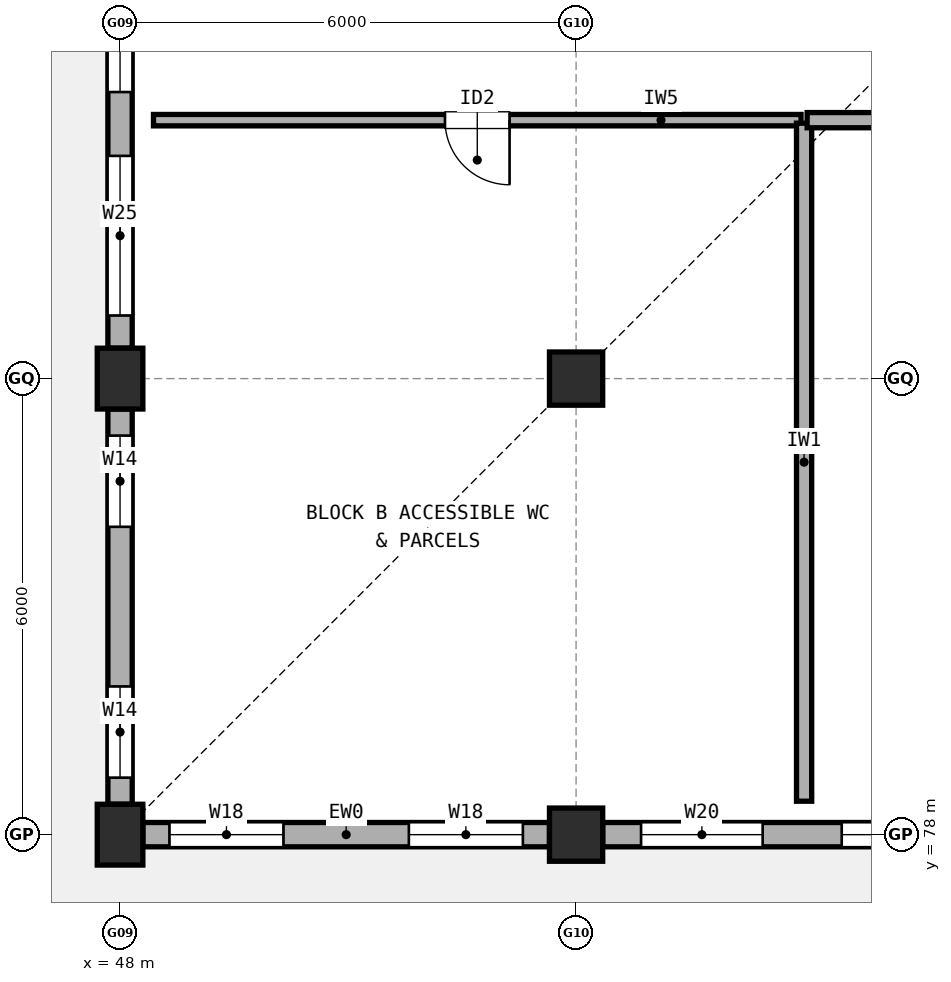
"""IFC4 building model, lengths in metres.
Left out: names, types, materials, properties, quantities, classifications, styles, units other than length and angle.
Written with IfcOpenShell. Run it as: python <this file> out.ifc"""

import sys

from ifc_helpers import new_model, si_unit, direction, frame, frame_2d, origin, origin_2d, place, context, subcontext, project, spatial, rectangle, extrude, element, fill, save


model = new_model("IFC4")
c1 = context("Model", 3, precision=1e-05, world=origin(), true_north=direction((0.0, 1.0)))
c2 = subcontext(c1, "Body", "Model", "MODEL_VIEW")
j1 = project(units=[si_unit("LENGTHUNIT", "METRE"), si_unit("PLANEANGLEUNIT", "RADIAN")], contexts=[c1])
p1 = place(None, origin())
s1 = spatial("IfcSite", under=j1, at=p1, CompositionType="ELEMENT")
p2 = place(p1, origin())
s2 = spatial("IfcBuilding", under=s1, at=p2, CompositionType="ELEMENT")
p3 = place(p2, origin())
s3 = spatial("IfcBuildingStorey", under=s2, at=p3, CompositionType="ELEMENT", Elevation=0.0)
for number, where, z_axis, x_axis in (
    (1, (48.0, 78.0, 0.0), (0.0, 0.0, 1.0), (1.0, 0.0, 0.0)),
    (2, (48.0, 84.0, 0.0), (0.0, 0.0, 1.0), (1.0, 0.0, 0.0)),
):
    element("IfcColumn", number, at=place(p3, frame(where, z_axis=z_axis, x_axis=x_axis)), inside=s3, PredefinedType="COLUMN", context=c2, shape_type="SweptSolid", body=[
        extrude(rectangle(XDim=0.6, YDim=0.8, at=origin_2d()), origin(), (0.0, 0.0, 1.0), 4.23),
    ])
for number, where, z_axis, x_axis in (
    (3, (54.0, 78.0, 0.0), (0.0, 0.0, 1.0), (1.0, 0.0, 0.0)),
    (4, (54.0, 84.0, 0.0), (0.0, 0.0, 1.0), (1.0, 0.0, 0.0)),
):
    element("IfcColumn", number, at=place(p3, frame(where, z_axis=z_axis, x_axis=x_axis)), inside=s3, PredefinedType="COLUMN", context=c2, shape_type="SweptSolid", body=[
        extrude(rectangle(XDim=0.7, YDim=0.7, at=origin_2d()), origin(), (0.0, 0.0, 1.0), 4.23),
    ])
p4 = place(p3, frame((48.3, 78.0, 0.0), z_axis=(0.0, 0.0, 1.0), x_axis=(1.0, 0.0, 0.0)))
e5 = element("IfcWall", 5, at=p4, inside=s3, PredefinedType="STANDARD", context=c2, shape_type="SweptSolid", body=[
    extrude(rectangle(XDim=5.35, YDim=0.32, at=frame_2d((2.675, 0.0))), origin(), (0.0, 0.0, 1.0), 3.112),
])
p5 = place(p4, frame((0.35, 0.0, 0.9)))
e6 = element("IfcOpeningElement", 6, at=p5, cuts=e5, PredefinedType="OPENING", context=c2, shape_type="SweptSolid", body=[
    extrude(rectangle(XDim=1.5, YDim=1.4, at=frame_2d((0.75, 0.7))), frame((0.0, 0.17, 0.0), z_axis=(0.0, -1.0, 0.0), x_axis=(1.0, 0.0, 0.0)), (0.0, 0.0, 1.0), 0.34),
])
p6 = place(p4, frame((3.5, 0.0, 0.9)))
e7 = element("IfcOpeningElement", 7, at=p6, cuts=e5, PredefinedType="OPENING", context=c2, shape_type="SweptSolid", body=[
    extrude(rectangle(XDim=1.5, YDim=1.4, at=frame_2d((0.75, 0.7))), frame((0.0, 0.17, 0.0), z_axis=(0.0, -1.0, 0.0), x_axis=(1.0, 0.0, 0.0)), (0.0, 0.0, 1.0), 0.34),
])
p7 = place(p3, frame((54.35, 78.0, 0.0), z_axis=(0.0, 0.0, 1.0), x_axis=(1.0, 0.0, 0.0)))
e8 = element("IfcWall", 8, at=p7, inside=s3, PredefinedType="STANDARD", context=c2, shape_type="SweptSolid", body=[
    extrude(rectangle(XDim=5.3, YDim=0.32, at=frame_2d((2.65, 0.0))), origin(), (0.0, 0.0, 1.0), 3.112),
])
p8 = place(p7, frame((0.505, 0.0, 0.9)))
e9 = element("IfcOpeningElement", 9, at=p8, cuts=e8, PredefinedType="OPENING", context=c2, shape_type="SweptSolid", body=[
    extrude(rectangle(XDim=1.6, YDim=1.5, at=frame_2d((0.8, 0.75))), frame((0.0, 0.17, 0.0), z_axis=(0.0, -1.0, 0.0), x_axis=(1.0, 0.0, 0.0)), (0.0, 0.0, 1.0), 0.34),
])
p9 = place(p7, frame((3.145, 0.0, 0.9)))
e10 = element("IfcOpeningElement", 10, at=p9, cuts=e8, PredefinedType="OPENING", context=c2, shape_type="SweptSolid", body=[
    extrude(rectangle(XDim=1.7, YDim=1.55, at=frame_2d((0.85, 0.775))), frame((0.0, 0.17, 0.0), z_axis=(0.0, -1.0, 0.0), x_axis=(1.0, 0.0, 0.0)), (0.0, 0.0, 1.0), 0.34),
])
p10 = place(p3, frame((48.0, 89.6, 0.0), z_axis=(0.0, 0.0, 1.0), x_axis=(0.0, -1.0, 0.0)))
e11 = element("IfcWall", 11, at=p10, inside=s3, PredefinedType="STANDARD", context=c2, shape_type="SweptSolid", body=[
    extrude(rectangle(XDim=5.2, YDim=0.32, at=frame_2d((2.6, 0.0))), origin(), (0.0, 0.0, 1.0), 3.712),
])
p11 = place(p10, frame((0.33, 0.0, 0.9)))
e12 = element("IfcOpeningElement", 12, at=p11, cuts=e11, PredefinedType="OPENING", context=c2, shape_type="SweptSolid", body=[
    extrude(rectangle(XDim=1.5, YDim=1.5, at=frame_2d((0.75, 0.75))), frame((0.0, 0.17, 0.0), z_axis=(0.0, -1.0, 0.0), x_axis=(1.0, 0.0, 0.0)), (0.0, 0.0, 1.0), 0.34),
])
p12 = place(p10, frame((2.67, 0.0, 0.9)))
e13 = element("IfcOpeningElement", 13, at=p12, cuts=e11, PredefinedType="OPENING", context=c2, shape_type="SweptSolid", body=[
    extrude(rectangle(XDim=2.1, YDim=1.55, at=frame_2d((1.05, 0.775))), frame((0.0, 0.17, 0.0), z_axis=(0.0, -1.0, 0.0), x_axis=(1.0, 0.0, 0.0)), (0.0, 0.0, 1.0), 0.34),
])
p13 = place(p3, frame((48.0, 83.6, 0.0), z_axis=(0.0, 0.0, 1.0), x_axis=(0.0, -1.0, 0.0)))
e14 = element("IfcWall", 14, at=p13, inside=s3, PredefinedType="STANDARD", context=c2, shape_type="SweptSolid", body=[
    extrude(rectangle(XDim=5.2, YDim=0.32, at=frame_2d((2.6, 0.0))), origin(), (0.0, 0.0, 1.0), 3.712),
])
p14 = place(p13, frame((0.35, 0.0, 0.9)))
e15 = element("IfcOpeningElement", 15, at=p14, cuts=e14, PredefinedType="OPENING", context=c2, shape_type="SweptSolid", body=[
    extrude(rectangle(XDim=1.2, YDim=1.5, at=frame_2d((0.6, 0.75))), frame((0.0, 0.17, 0.0), z_axis=(0.0, -1.0, 0.0), x_axis=(1.0, 0.0, 0.0)), (0.0, 0.0, 1.0), 0.34),
])
p15 = place(p13, frame((3.65, 0.0, 0.9)))
e16 = element("IfcOpeningElement", 16, at=p15, cuts=e14, PredefinedType="OPENING", context=c2, shape_type="SweptSolid", body=[
    extrude(rectangle(XDim=1.2, YDim=1.5, at=frame_2d((0.6, 0.75))), frame((0.0, 0.17, 0.0), z_axis=(0.0, -1.0, 0.0), x_axis=(1.0, 0.0, 0.0)), (0.0, 0.0, 1.0), 0.34),
])
p16 = place(p3, frame((48.44, 87.4, 0.0), z_axis=(0.0, 0.0, 1.0), x_axis=(1.0, 0.0, 0.0)))
e17 = element("IfcWall", 17, at=p16, inside=s3, PredefinedType="PARTITIONING", context=c2, shape_type="SweptSolid", body=[
    extrude(rectangle(XDim=8.52, YDim=0.15, at=frame_2d((4.26, 0.0))), origin(), (0.0, 0.0, 1.0), 3.612),
])
p17 = place(p16, frame((3.835, 0.0, 0.0)))
e18 = element("IfcOpeningElement", 18, at=p17, cuts=e17, PredefinedType="OPENING", context=c2, shape_type="SweptSolid", body=[
    extrude(rectangle(XDim=0.85, YDim=2.1, at=frame_2d((0.425, 1.05))), frame((0.0, 0.085, 0.0), z_axis=(0.0, -1.0, 0.0), x_axis=(1.0, 0.0, 0.0)), (0.0, 0.0, 1.0), 0.17),
])
p18 = place(p3, frame((57.0, 78.44, 0.0), z_axis=(0.0, 0.0, 1.0), x_axis=(0.0, 1.0, 0.0)))
e19 = element("IfcWall", 19, at=p18, inside=s3, PredefinedType="SOLIDWALL", context=c2, shape_type="SweptSolid", body=[
    extrude(rectangle(XDim=8.92, YDim=0.2, at=frame_2d((4.46, 0.0))), origin(), (0.0, 0.0, 1.0), 3.562),
])
p19 = place(p3, frame((57.04, 87.4, 0.0), z_axis=(0.0, 0.0, 1.0), x_axis=(1.0, 0.0, 0.0)))
e20 = element("IfcWall", 20, at=p19, inside=s3, PredefinedType="SOLIDWALL", context=c2, shape_type="SweptSolid", body=[
    extrude(rectangle(XDim=17.92, YDim=0.2, at=frame_2d((8.96, 0.0))), origin(), (0.0, 0.0, 1.0), 3.612),
])
p20 = place(p19, frame((8.31, 0.0, 0.0)))
e21 = element("IfcOpeningElement", 21, at=p20, cuts=e20, PredefinedType="OPENING", context=c2, shape_type="SweptSolid", body=[
    extrude(rectangle(XDim=1.3, YDim=2.15, at=frame_2d((0.65, 1.075))), frame((0.0, 0.11, 0.0), z_axis=(0.0, -1.0, 0.0), x_axis=(1.0, 0.0, 0.0)), (0.0, 0.0, 1.0), 0.22),
])
p21 = place(p5, origin())
e22 = element("IfcWindow", 22, at=p21, inside=s3, PartitioningType="SINGLE_PANEL", PredefinedType="WINDOW", context=c2, shape_type="SweptSolid", body=[
    extrude(rectangle(XDim=1.5, YDim=1.4, at=frame_2d((0.75, 0.7))), frame((0.0, 0.03, 0.0), z_axis=(0.0, -1.0, 0.0), x_axis=(1.0, 0.0, 0.0)), (0.0, 0.0, 1.0), 0.06),
])
fill(e6, e22)
p22 = place(p6, origin())
e23 = element("IfcWindow", 23, at=p22, inside=s3, PartitioningType="SINGLE_PANEL", PredefinedType="WINDOW", context=c2, shape_type="SweptSolid", body=[
    extrude(rectangle(XDim=1.5, YDim=1.4, at=frame_2d((0.75, 0.7))), frame((0.0, 0.03, 0.0), z_axis=(0.0, -1.0, 0.0), x_axis=(1.0, 0.0, 0.0)), (0.0, 0.0, 1.0), 0.06),
])
fill(e7, e23)
p23 = place(p8, origin())
e24 = element("IfcWindow", 24, at=p23, inside=s3, PartitioningType="SINGLE_PANEL", PredefinedType="WINDOW", context=c2, shape_type="SweptSolid", body=[
    extrude(rectangle(XDim=1.6, YDim=1.5, at=frame_2d((0.8, 0.75))), frame((0.0, 0.03, 0.0), z_axis=(0.0, -1.0, 0.0), x_axis=(1.0, 0.0, 0.0)), (0.0, 0.0, 1.0), 0.06),
])
fill(e9, e24)
p24 = place(p9, origin())
e25 = element("IfcWindow", 25, at=p24, inside=s3, PartitioningType="SINGLE_PANEL", PredefinedType="WINDOW", context=c2, shape_type="SweptSolid", body=[
    extrude(rectangle(XDim=1.7, YDim=1.55, at=frame_2d((0.85, 0.775))), frame((0.0, 0.03, 0.0), z_axis=(0.0, -1.0, 0.0), x_axis=(1.0, 0.0, 0.0)), (0.0, 0.0, 1.0), 0.06),
])
fill(e10, e25)
p25 = place(p11, origin())
e26 = element("IfcWindow", 26, at=p25, inside=s3, PartitioningType="SINGLE_PANEL", PredefinedType="WINDOW", context=c2, shape_type="SweptSolid", body=[
    extrude(rectangle(XDim=1.5, YDim=1.5, at=frame_2d((0.75, 0.75))), frame((0.0, 0.03, 0.0), z_axis=(0.0, -1.0, 0.0), x_axis=(1.0, 0.0, 0.0)), (0.0, 0.0, 1.0), 0.06),
])
fill(e12, e26)
p26 = place(p12, origin())
e27 = element("IfcWindow", 27, at=p26, inside=s3, PartitioningType="SINGLE_PANEL", PredefinedType="WINDOW", context=c2, shape_type="SweptSolid", body=[
    extrude(rectangle(XDim=2.1, YDim=1.55, at=frame_2d((1.05, 0.775))), frame((0.0, 0.03, 0.0), z_axis=(0.0, -1.0, 0.0), x_axis=(1.0, 0.0, 0.0)), (0.0, 0.0, 1.0), 0.06),
])
fill(e13, e27)
p27 = place(p14, origin())
e28 = element("IfcWindow", 28, at=p27, inside=s3, PartitioningType="SINGLE_PANEL", PredefinedType="WINDOW", context=c2, shape_type="SweptSolid", body=[
    extrude(rectangle(XDim=1.2, YDim=1.5, at=frame_2d((0.6, 0.75))), frame((0.0, 0.03, 0.0), z_axis=(0.0, -1.0, 0.0), x_axis=(1.0, 0.0, 0.0)), (0.0, 0.0, 1.0), 0.06),
])
fill(e15, e28)
p28 = place(p15, origin())
e29 = element("IfcWindow", 29, at=p28, inside=s3, PartitioningType="SINGLE_PANEL", PredefinedType="WINDOW", context=c2, shape_type="SweptSolid", body=[
    extrude(rectangle(XDim=1.2, YDim=1.5, at=frame_2d((0.6, 0.75))), frame((0.0, 0.03, 0.0), z_axis=(0.0, -1.0, 0.0), x_axis=(1.0, 0.0, 0.0)), (0.0, 0.0, 1.0), 0.06),
])
fill(e16, e29)
p29 = place(p17, origin())
e30 = element("IfcDoor", 30, at=p29, inside=s3, OperationType="SINGLE_SWING_RIGHT", PredefinedType="DOOR", context=c2, shape_type="SweptSolid", body=[
    extrude(rectangle(XDim=0.85, YDim=2.1, at=frame_2d((0.425, 1.05))), frame((0.0, 0.025, 0.0), z_axis=(0.0, -1.0, 0.0), x_axis=(1.0, 0.0, 0.0)), (0.0, 0.0, 1.0), 0.05),
])
fill(e18, e30)
save(model, sys.argv[1])
